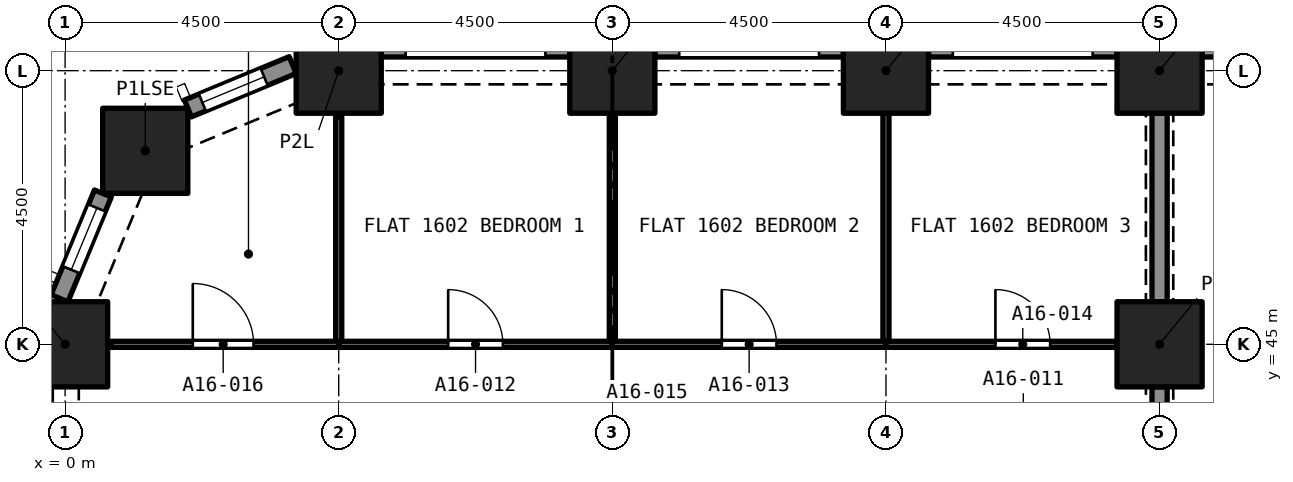
"""IFC4 building model, lengths in metres.
Left out: names, types, materials, properties, quantities, classifications, styles, units other than length and angle.
Written with IfcOpenShell. Run it as: python <this file> out.ifc"""

import sys

from ifc_helpers import new_model, si_unit, direction, frame, frame_2d, origin, origin_2d, place, context, subcontext, project, spatial, rectangle, extrude, element, fill, save


model = new_model("IFC4")
c1 = context("Model", 3, precision=1e-05, world=origin(), true_north=direction((0.0, 1.0)))
c2 = subcontext(c1, "Body", "Model", "MODEL_VIEW")
j1 = project(units=[si_unit("LENGTHUNIT", "METRE"), si_unit("PLANEANGLEUNIT", "RADIAN")], contexts=[c1])
p1 = place(None, origin())
s1 = spatial("IfcSite", under=j1, at=p1, CompositionType="ELEMENT")
p2 = place(p1, origin())
s2 = spatial("IfcBuilding", under=s1, at=p2, CompositionType="ELEMENT")
p3 = place(p2, frame((0.0, 0.0, 62.4)))
s3 = spatial("IfcBuildingStorey", under=s2, at=p3, CompositionType="ELEMENT", Elevation=62.4)
for number, where, z_axis, x_axis in (
    (1, (0.0, 45.0, 0.0), (0.0, 0.0, 1.0), (1.0, 0.0, 0.0)),
    (2, (18.0, 45.0, 0.0), (0.0, 0.0, 1.0), (1.0, 0.0, 0.0)),
    (3, (1.318, 48.182, 0.0), (0.0, 0.0, 1.0), (1.0, 0.0, 0.0)),
    (4, (4.5, 49.5, 0.0), (0.0, 0.0, 1.0), (1.0, 0.0, 0.0)),
    (5, (9.0, 49.5, 0.0), (0.0, 0.0, 1.0), (1.0, 0.0, 0.0)),
    (6, (13.5, 49.5, 0.0), (0.0, 0.0, 1.0), (1.0, 0.0, 0.0)),
    (7, (18.0, 49.5, 0.0), (0.0, 0.0, 1.0), (1.0, 0.0, 0.0)),
):
    element("IfcColumn", number, at=place(p3, frame(where, z_axis=z_axis, x_axis=x_axis)), inside=s3, PredefinedType="COLUMN", context=c2, shape_type="SweptSolid", body=[
        extrude(rectangle(XDim=1.4, YDim=1.4, at=origin_2d()), origin(), (0.0, 0.0, 1.0), 3.2),
    ])
p4 = place(p3, frame((18.7, 49.875, 0.0), z_axis=(0.0, 0.0, 1.0), x_axis=(1.0, 0.0, 0.0)))
e8 = element("IfcWall", 8, at=p4, inside=s3, PredefinedType="SOLIDWALL", context=c2, shape_type="SweptSolid", body=[
    extrude(rectangle(XDim=3.1, YDim=0.3, at=frame_2d((1.55, 0.0))), origin(), (0.0, 0.0, 1.0), 3.2),
])
p5 = place(p4, frame((0.4, 0.0, 0.45)))
e9 = element("IfcOpeningElement", 9, at=p5, cuts=e8, PredefinedType="OPENING", context=c2, shape_type="SweptSolid", body=[
    extrude(rectangle(XDim=2.3, YDim=1.95, at=frame_2d((1.15, 0.975))), frame((0.0, 0.16, 0.0), z_axis=(0.0, -1.0, 0.0), x_axis=(1.0, 0.0, 0.0)), (0.0, 0.0, 1.0), 0.32),
])
p6 = place(p3, frame((14.2, 49.875, 0.0), z_axis=(0.0, 0.0, 1.0), x_axis=(1.0, 0.0, 0.0)))
e10 = element("IfcWall", 10, at=p6, inside=s3, PredefinedType="SOLIDWALL", context=c2, shape_type="SweptSolid", body=[
    extrude(rectangle(XDim=3.1, YDim=0.3, at=frame_2d((1.55, 0.0))), origin(), (0.0, 0.0, 1.0), 3.2),
])
p7 = place(p6, frame((0.4, 0.0, 0.45)))
e11 = element("IfcOpeningElement", 11, at=p7, cuts=e10, PredefinedType="OPENING", context=c2, shape_type="SweptSolid", body=[
    extrude(rectangle(XDim=2.3, YDim=1.95, at=frame_2d((1.15, 0.975))), frame((0.0, 0.16, 0.0), z_axis=(0.0, -1.0, 0.0), x_axis=(1.0, 0.0, 0.0)), (0.0, 0.0, 1.0), 0.32),
])
p8 = place(p3, frame((9.7, 49.875, 0.0), z_axis=(0.0, 0.0, 1.0), x_axis=(1.0, 0.0, 0.0)))
e12 = element("IfcWall", 12, at=p8, inside=s3, PredefinedType="SOLIDWALL", context=c2, shape_type="SweptSolid", body=[
    extrude(rectangle(XDim=3.1, YDim=0.3, at=frame_2d((1.55, 0.0))), origin(), (0.0, 0.0, 1.0), 3.2),
])
p9 = place(p8, frame((0.4, 0.0, 0.45)))
e13 = element("IfcOpeningElement", 13, at=p9, cuts=e12, PredefinedType="OPENING", context=c2, shape_type="SweptSolid", body=[
    extrude(rectangle(XDim=2.3, YDim=1.95, at=frame_2d((1.15, 0.975))), frame((0.0, 0.16, 0.0), z_axis=(0.0, -1.0, 0.0), x_axis=(1.0, 0.0, 0.0)), (0.0, 0.0, 1.0), 0.32),
])
p10 = place(p3, frame((5.2, 49.875, 0.0), z_axis=(0.0, 0.0, 1.0), x_axis=(1.0, 0.0, 0.0)))
e14 = element("IfcWall", 14, at=p10, inside=s3, PredefinedType="SOLIDWALL", context=c2, shape_type="SweptSolid", body=[
    extrude(rectangle(XDim=3.1, YDim=0.3, at=frame_2d((1.55, 0.0))), origin(), (0.0, 0.0, 1.0), 3.2),
])
p11 = place(p10, frame((0.4, 0.0, 0.45)))
e15 = element("IfcOpeningElement", 15, at=p11, cuts=e14, PredefinedType="OPENING", context=c2, shape_type="SweptSolid", body=[
    extrude(rectangle(XDim=2.3, YDim=1.95, at=frame_2d((1.15, 0.975))), frame((0.0, 0.16, 0.0), z_axis=(0.0, -1.0, 0.0), x_axis=(1.0, 0.0, 0.0)), (0.0, 0.0, 1.0), 0.32),
])
p12 = place(p3, frame((2.02, 48.878, 0.0), z_axis=(0.0, 0.0, 1.0), x_axis=(0.923903565336, 0.38262540684, 0.0)))
e16 = element("IfcWall", 16, at=p12, inside=s3, PredefinedType="SOLIDWALL", context=c2, shape_type="SweptSolid", body=[
    extrude(rectangle(XDim=1.865, YDim=0.3, at=frame_2d((0.933, 0.0))), origin(), (0.0, 0.0, 1.0), 3.2),
])
p13 = place(p12, frame((0.258, 0.0, 0.45)))
e17 = element("IfcOpeningElement", 17, at=p13, cuts=e16, PredefinedType="OPENING", context=c2, shape_type="SweptSolid", body=[
    extrude(rectangle(XDim=1.1, YDim=1.95, at=frame_2d((0.55, 0.975))), frame((0.0, 0.16, 0.0), z_axis=(0.0, -1.0, 0.0), x_axis=(1.0, 0.0, 0.0)), (0.0, 0.0, 1.0), 0.32),
])
p14 = place(p3, frame((-0.092, 45.757, 0.0), z_axis=(0.0, 0.0, 1.0), x_axis=(0.382737135771, 0.923857286003, 0.0)))
e18 = element("IfcWall", 18, at=p14, inside=s3, PredefinedType="SOLIDWALL", context=c2, shape_type="SweptSolid", body=[
    extrude(rectangle(XDim=1.865, YDim=0.3, at=frame_2d((0.933, 0.0))), origin(), (0.0, 0.0, 1.0), 3.2),
])
p15 = place(p14, frame((0.508, 0.0, 0.45)))
e19 = element("IfcOpeningElement", 19, at=p15, cuts=e18, PredefinedType="OPENING", context=c2, shape_type="SweptSolid", body=[
    extrude(rectangle(XDim=1.1, YDim=1.95, at=frame_2d((0.55, 0.975))), frame((0.0, 0.16, 0.0), z_axis=(0.0, -1.0, 0.0), x_axis=(1.0, 0.0, 0.0)), (0.0, 0.0, 1.0), 0.32),
])
p16 = place(p3, frame((18.0, 41.2, 0.0), z_axis=(0.0, 0.0, 1.0), x_axis=(0.0, 1.0, 0.0)))
e20 = element("IfcWall", 20, at=p16, inside=s3, PredefinedType="PARTITIONING", context=c2, shape_type="SweptSolid", body=[
    extrude(rectangle(XDim=3.1, YDim=0.25, at=frame_2d((1.55, 0.0))), origin(), (0.0, 0.0, 1.0), 2.38),
])
p17 = place(p3, frame((9.0, 45.05, 0.0), z_axis=(0.0, 0.0, 1.0), x_axis=(0.0, 1.0, 0.0)))
e21 = element("IfcWall", 21, at=p17, inside=s3, PredefinedType="PARTITIONING", context=c2, shape_type="SweptSolid", body=[
    extrude(rectangle(XDim=3.75, YDim=0.1, at=frame_2d((1.875, 0.0))), origin(), (0.0, 0.0, 1.0), 2.9),
])
p18 = place(p3, frame((4.5, 45.0, 0.0), z_axis=(0.0, 0.0, 1.0), x_axis=(1.0, 0.0, 0.0)))
e22 = element("IfcWall", 22, at=p18, inside=s3, PredefinedType="PARTITIONING", context=c2, shape_type="SweptSolid", body=[
    extrude(rectangle(XDim=4.5, YDim=0.1, at=frame_2d((2.25, 0.0))), origin(), (0.0, 0.0, 1.0), 2.9),
])
p19 = place(p18, frame((1.8, 0.0, 0.0)))
e23 = element("IfcOpeningElement", 23, at=p19, cuts=e22, PredefinedType="OPENING", context=c2, shape_type="SweptSolid", body=[
    extrude(rectangle(XDim=0.9, YDim=2.1, at=frame_2d((0.45, 1.05))), frame((0.0, 0.06, 0.0), z_axis=(0.0, -1.0, 0.0), x_axis=(1.0, 0.0, 0.0)), (0.0, 0.0, 1.0), 0.12),
])
p20 = place(p3, frame((4.5, 45.05, 0.0), z_axis=(0.0, 0.0, 1.0), x_axis=(0.0, 1.0, 0.0)))
e24 = element("IfcWall", 24, at=p20, inside=s3, PredefinedType="PARTITIONING", context=c2, shape_type="SweptSolid", body=[
    extrude(rectangle(XDim=3.692, YDim=0.1, at=frame_2d((1.846, 0.0))), origin(), (0.0, 0.0, 1.0), 2.9),
])
p21 = place(p3, frame((13.5, 45.05, 0.0), z_axis=(0.0, 0.0, 1.0), x_axis=(0.0, 1.0, 0.0)))
e25 = element("IfcWall", 25, at=p21, inside=s3, PredefinedType="PARTITIONING", context=c2, shape_type="SweptSolid", body=[
    extrude(rectangle(XDim=3.75, YDim=0.1, at=frame_2d((1.875, 0.0))), origin(), (0.0, 0.0, 1.0), 2.9),
])
p22 = place(p3, frame((9.0, 45.0, 0.0), z_axis=(0.0, 0.0, 1.0), x_axis=(1.0, 0.0, 0.0)))
e26 = element("IfcWall", 26, at=p22, inside=s3, PredefinedType="PARTITIONING", context=c2, shape_type="SweptSolid", body=[
    extrude(rectangle(XDim=4.5, YDim=0.1, at=frame_2d((2.25, 0.0))), origin(), (0.0, 0.0, 1.0), 2.9),
])
p23 = place(p22, frame((1.8, 0.0, 0.0)))
e27 = element("IfcOpeningElement", 27, at=p23, cuts=e26, PredefinedType="OPENING", context=c2, shape_type="SweptSolid", body=[
    extrude(rectangle(XDim=0.9, YDim=2.1, at=frame_2d((0.45, 1.05))), frame((0.0, 0.06, 0.0), z_axis=(0.0, -1.0, 0.0), x_axis=(1.0, 0.0, 0.0)), (0.0, 0.0, 1.0), 0.12),
])
p24 = place(p3, frame((13.5, 45.0, 0.0), z_axis=(0.0, 0.0, 1.0), x_axis=(1.0, 0.0, 0.0)))
e28 = element("IfcWall", 28, at=p24, inside=s3, PredefinedType="PARTITIONING", context=c2, shape_type="SweptSolid", body=[
    extrude(rectangle(XDim=3.8, YDim=0.1, at=frame_2d((1.9, 0.0))), origin(), (0.0, 0.0, 1.0), 2.9),
])
p25 = place(p24, frame((1.8, 0.0, 0.0)))
e29 = element("IfcOpeningElement", 29, at=p25, cuts=e28, PredefinedType="OPENING", context=c2, shape_type="SweptSolid", body=[
    extrude(rectangle(XDim=0.9, YDim=2.1, at=frame_2d((0.45, 1.05))), frame((0.0, 0.06, 0.0), z_axis=(0.0, -1.0, 0.0), x_axis=(1.0, 0.0, 0.0)), (0.0, 0.0, 1.0), 0.12),
])
p26 = place(p3, frame((18.0, 45.7, 0.0), z_axis=(0.0, 0.0, 1.0), x_axis=(0.0, 1.0, 0.0)))
e30 = element("IfcWall", 30, at=p26, inside=s3, PredefinedType="PARTITIONING", context=c2, shape_type="SweptSolid", body=[
    extrude(rectangle(XDim=3.1, YDim=0.25, at=frame_2d((1.55, 0.0))), origin(), (0.0, 0.0, 1.0), 2.38),
])
p27 = place(p3, frame((0.758, 45.0, 0.0), z_axis=(0.0, 0.0, 1.0), x_axis=(1.0, 0.0, 0.0)))
e31 = element("IfcWall", 31, at=p27, inside=s3, PredefinedType="PARTITIONING", context=c2, shape_type="SweptSolid", body=[
    extrude(rectangle(XDim=3.742, YDim=0.1, at=frame_2d((1.871, 0.0))), origin(), (0.0, 0.0, 1.0), 2.9),
])
p28 = place(p27, frame((1.342, 0.0, 0.0)))
e32 = element("IfcOpeningElement", 32, at=p28, cuts=e31, PredefinedType="OPENING", context=c2, shape_type="SweptSolid", body=[
    extrude(rectangle(XDim=1.0, YDim=2.1, at=frame_2d((0.5, 1.05))), frame((0.0, 0.06, 0.0), z_axis=(0.0, -1.0, 0.0), x_axis=(1.0, 0.0, 0.0)), (0.0, 0.0, 1.0), 0.12),
])
p29 = place(p13, origin())
e33 = element("IfcWindow", 33, at=p29, inside=s3, PartitioningType="SINGLE_PANEL", PredefinedType="WINDOW", context=c2, shape_type="SweptSolid", body=[
    extrude(rectangle(XDim=1.1, YDim=1.95, at=frame_2d((0.55, 0.975))), frame((0.0, 0.03, 0.0), z_axis=(0.0, -1.0, 0.0), x_axis=(1.0, 0.0, 0.0)), (0.0, 0.0, 1.0), 0.06),
])
fill(e17, e33)
p30 = place(p15, origin())
e34 = element("IfcWindow", 34, at=p30, inside=s3, PartitioningType="SINGLE_PANEL", PredefinedType="WINDOW", context=c2, shape_type="SweptSolid", body=[
    extrude(rectangle(XDim=1.1, YDim=1.95, at=frame_2d((0.55, 0.975))), frame((0.0, 0.03, 0.0), z_axis=(0.0, -1.0, 0.0), x_axis=(1.0, 0.0, 0.0)), (0.0, 0.0, 1.0), 0.06),
])
fill(e19, e34)
p31 = place(p19, origin())
e35 = element("IfcDoor", 35, at=p31, inside=s3, OperationType="SINGLE_SWING_RIGHT", PredefinedType="DOOR", context=c2, shape_type="SweptSolid", body=[
    extrude(rectangle(XDim=0.9, YDim=2.1, at=frame_2d((0.45, 1.05))), frame((0.0, 0.025, 0.0), z_axis=(0.0, -1.0, 0.0), x_axis=(1.0, 0.0, 0.0)), (0.0, 0.0, 1.0), 0.05),
])
fill(e23, e35)
p32 = place(p23, origin())
e36 = element("IfcDoor", 36, at=p32, inside=s3, OperationType="SINGLE_SWING_LEFT", PredefinedType="DOOR", context=c2, shape_type="SweptSolid", body=[
    extrude(rectangle(XDim=0.9, YDim=2.1, at=frame_2d((0.45, 1.05))), frame((0.0, 0.025, 0.0), z_axis=(0.0, -1.0, 0.0), x_axis=(1.0, 0.0, 0.0)), (0.0, 0.0, 1.0), 0.05),
])
fill(e27, e36)
p33 = place(p25, origin())
e37 = element("IfcDoor", 37, at=p33, inside=s3, OperationType="SINGLE_SWING_RIGHT", PredefinedType="DOOR", context=c2, shape_type="SweptSolid", body=[
    extrude(rectangle(XDim=0.9, YDim=2.1, at=frame_2d((0.45, 1.05))), frame((0.0, 0.025, 0.0), z_axis=(0.0, -1.0, 0.0), x_axis=(1.0, 0.0, 0.0)), (0.0, 0.0, 1.0), 0.05),
])
fill(e29, e37)
p34 = place(p28, origin())
e38 = element("IfcDoor", 38, at=p34, inside=s3, OperationType="SINGLE_SWING_LEFT", PredefinedType="DOOR", context=c2, shape_type="SweptSolid", body=[
    extrude(rectangle(XDim=1.0, YDim=2.1, at=frame_2d((0.5, 1.05))), frame((0.0, 0.025, 0.0), z_axis=(0.0, -1.0, 0.0), x_axis=(1.0, 0.0, 0.0)), (0.0, 0.0, 1.0), 0.05),
])
fill(e32, e38)
save(model, sys.argv[1])
